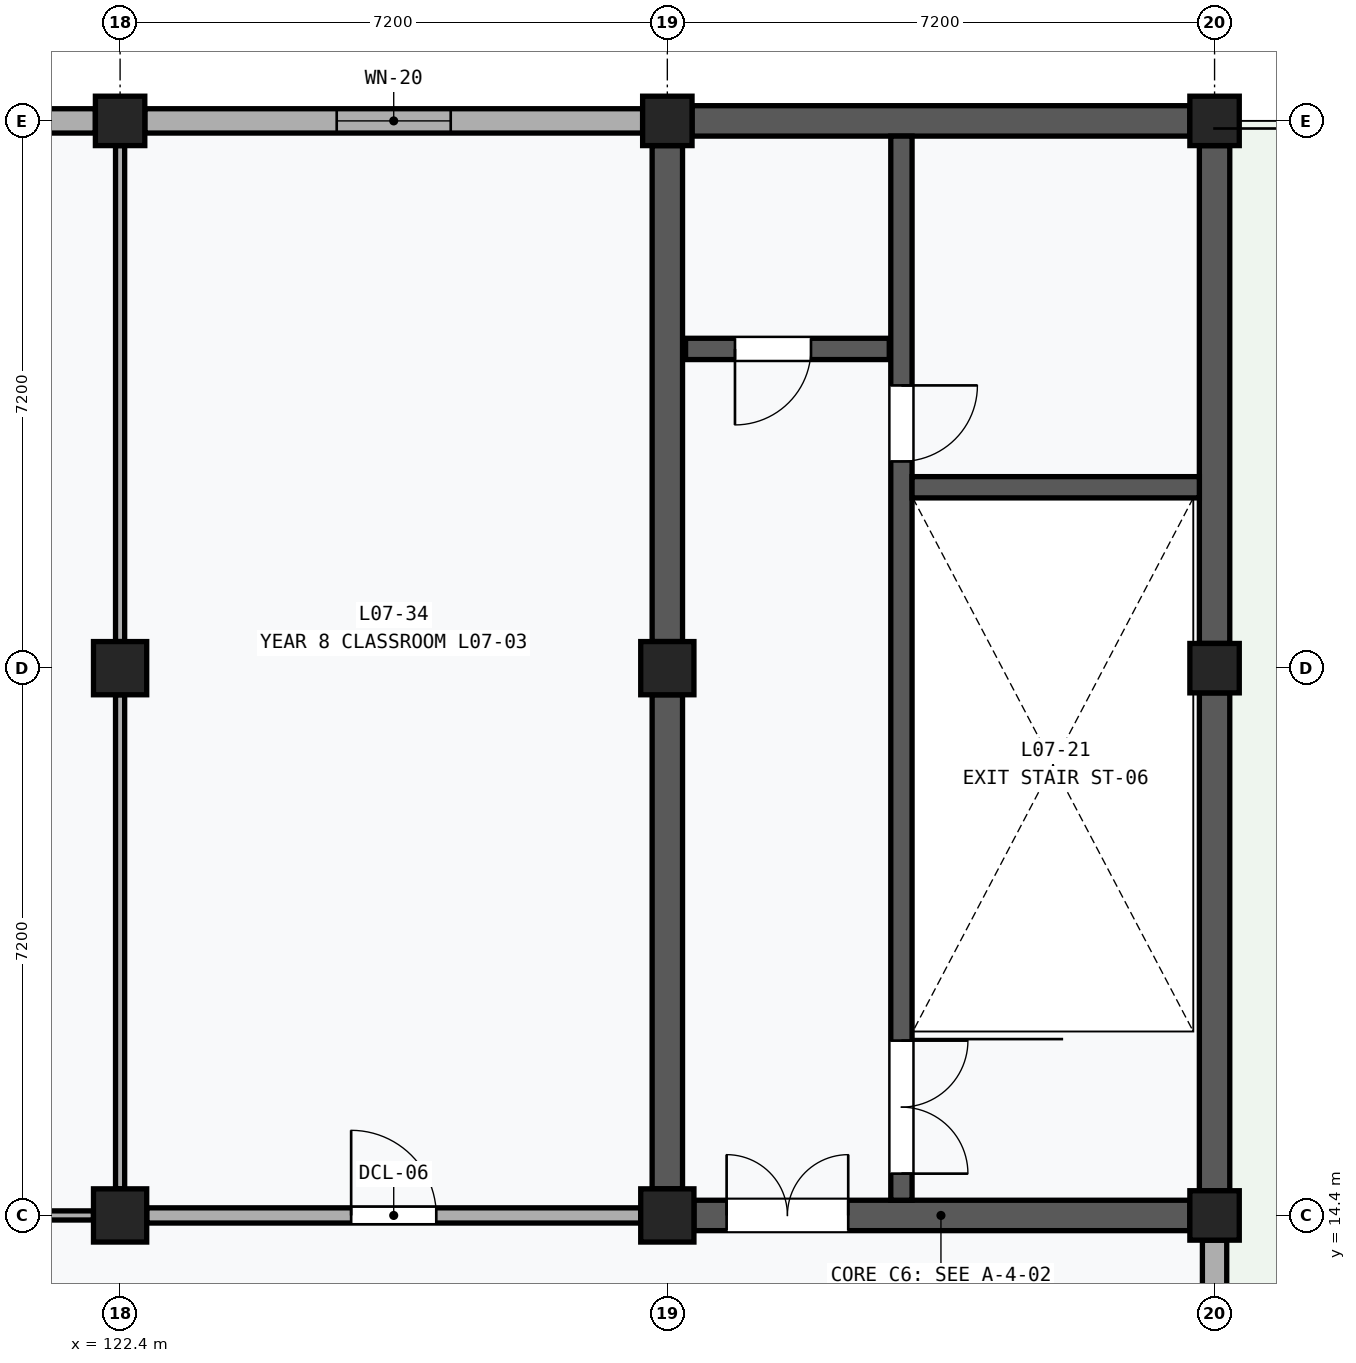
"""IFC4 building model, lengths in metres.
Left out: names, types, materials, properties, quantities, classifications, styles, units other than length and angle.
Written with IfcOpenShell. Run it as: python <this file> out.ifc"""

import sys

from ifc_helpers import new_model, si_unit, direction, frame, frame_2d, origin, origin_2d, place, context, subcontext, project, spatial, rectangle, extrude, element, fill, save


model = new_model("IFC4")
c1 = context("Model", 3, precision=1e-05, world=origin(), true_north=direction((0.0, 1.0)))
c2 = subcontext(c1, "Body", "Model", "MODEL_VIEW")
j1 = project(units=[si_unit("LENGTHUNIT", "METRE"), si_unit("PLANEANGLEUNIT", "RADIAN")], contexts=[c1])
p1 = place(None, origin())
s1 = spatial("IfcSite", under=j1, at=p1, CompositionType="ELEMENT")
p2 = place(p1, origin())
s2 = spatial("IfcBuilding", under=s1, at=p2, CompositionType="ELEMENT")
p3 = place(p2, frame((0.0, 0.0, 30.6)))
s3 = spatial("IfcBuildingStorey", under=s2, at=p3, CompositionType="ELEMENT", Elevation=30.6)
for number, where, z_axis, x_axis in (
    (1, (122.4, 14.4, 0.0), (0.0, 0.0, 1.0), (1.0, 0.0, 0.0)),
    (2, (122.4, 21.6, 0.0), (0.0, 0.0, 1.0), (1.0, 0.0, 0.0)),
):
    element("IfcColumn", number, at=place(p3, frame(where, z_axis=z_axis, x_axis=x_axis)), inside=s3, PredefinedType="COLUMN", context=c2, shape_type="SweptSolid", body=[
        extrude(rectangle(XDim=0.7, YDim=0.7, at=origin_2d()), origin(), (0.0, 0.0, 1.0), 4.2),
    ])
p4 = place(p3, frame((122.4, 28.8, 0.0), z_axis=(0.0, 0.0, 1.0), x_axis=(1.0, 0.0, 0.0)))
e3 = element("IfcColumn", 3, at=p4, inside=s3, PredefinedType="COLUMN", context=c2, shape_type="SweptSolid", body=[
    extrude(rectangle(XDim=0.65, YDim=0.65, at=origin_2d()), origin(), (0.0, 0.0, 1.0), 4.2),
])
for number, where, z_axis, x_axis in (
    (4, (129.6, 14.4, 0.0), (0.0, 0.0, 1.0), (1.0, 0.0, 0.0)),
    (5, (129.6, 21.6, 0.0), (0.0, 0.0, 1.0), (1.0, 0.0, 0.0)),
):
    element("IfcColumn", number, at=place(p3, frame(where, z_axis=z_axis, x_axis=x_axis)), inside=s3, PredefinedType="COLUMN", context=c2, shape_type="SweptSolid", body=[
        extrude(rectangle(XDim=0.7, YDim=0.7, at=origin_2d()), origin(), (0.0, 0.0, 1.0), 4.2),
    ])
for number, where, z_axis, x_axis in (
    (6, (129.6, 28.8, 0.0), (0.0, 0.0, 1.0), (1.0, 0.0, 0.0)),
    (7, (136.8, 14.4, 0.0), (0.0, 0.0, 1.0), (1.0, 0.0, 0.0)),
    (8, (136.8, 21.6, 0.0), (0.0, 0.0, 1.0), (1.0, 0.0, 0.0)),
    (9, (136.8, 28.8, 0.0), (0.0, 0.0, 1.0), (1.0, 0.0, 0.0)),
):
    element("IfcColumn", number, at=place(p3, frame(where, z_axis=z_axis, x_axis=x_axis)), inside=s3, PredefinedType="COLUMN", context=c2, shape_type="SweptSolid", body=[
        extrude(rectangle(XDim=0.65, YDim=0.65, at=origin_2d()), origin(), (0.0, 0.0, 1.0), 4.2),
    ])
p5 = place(p3, frame((115.45, 28.8, 0.0), z_axis=(0.0, 0.0, 1.0), x_axis=(1.0, 0.0, 0.0)))
e10 = element("IfcWall", 10, at=p5, inside=s3, PredefinedType="SOLIDWALL", context=c2, shape_type="SweptSolid", body=[
    extrude(rectangle(XDim=6.625, YDim=0.32, at=frame_2d((3.312, 0.0))), origin(), (0.0, 0.0, 1.0), 3.25),
])
p6 = place(p5, frame((2.062, 0.0, 1.1)))
e11 = element("IfcOpeningElement", 11, at=p6, cuts=e10, PredefinedType="OPENING", context=c2, shape_type="SweptSolid", body=[
    extrude(rectangle(XDim=2.5, YDim=1.5, at=frame_2d((1.25, 0.75))), frame((0.0, 0.172, 0.0), z_axis=(0.0, -1.0, 0.0), x_axis=(1.0, 0.0, 0.0)), (0.0, 0.0, 1.0), 0.344),
])
p7 = place(p3, frame((122.725, 28.8, 0.0), z_axis=(0.0, 0.0, 1.0), x_axis=(1.0, 0.0, 0.0)))
e12 = element("IfcWall", 12, at=p7, inside=s3, PredefinedType="SOLIDWALL", context=c2, shape_type="SweptSolid", body=[
    extrude(rectangle(XDim=6.55, YDim=0.32, at=frame_2d((3.275, 0.0))), origin(), (0.0, 0.0, 1.0), 3.25),
])
p8 = place(p7, frame((2.525, 0.0, 1.2)))
e13 = element("IfcOpeningElement", 13, at=p8, cuts=e12, PredefinedType="OPENING", context=c2, shape_type="SweptSolid", body=[
    extrude(rectangle(XDim=1.5, YDim=1.35, at=frame_2d((0.75, 0.675))), frame((0.0, 0.172, 0.0), z_axis=(0.0, -1.0, 0.0), x_axis=(1.0, 0.0, 0.0)), (0.0, 0.0, 1.0), 0.344),
])
p9 = place(p3, frame((136.8, 7.575, 0.0), z_axis=(0.0, 0.0, 1.0), x_axis=(0.0, 1.0, 0.0)))
e14 = element("IfcWall", 14, at=p9, inside=s3, PredefinedType="SOLIDWALL", context=c2, shape_type="SweptSolid", body=[
    extrude(rectangle(XDim=6.5, YDim=0.32, at=frame_2d((3.25, 0.0))), origin(), (0.0, 0.0, 1.0), 3.25),
])
p10 = place(p9, frame((2.35, 0.0, 0.0)))
e15 = element("IfcOpeningElement", 15, at=p10, cuts=e14, PredefinedType="OPENING", context=c2, shape_type="SweptSolid", body=[
    extrude(rectangle(XDim=1.8, YDim=2.2, at=frame_2d((0.9, 1.1))), frame((0.0, 0.172, 0.0), z_axis=(0.0, -1.0, 0.0), x_axis=(1.0, 0.0, 0.0)), (0.0, 0.0, 1.0), 0.344),
])
p11 = place(p3, frame((129.6, 14.75, 0.0), z_axis=(0.0, 0.0, 1.0), x_axis=(0.0, 1.0, 0.0)))
e16 = element("IfcWall", 16, at=p11, inside=s3, PredefinedType="SHEAR", context=c2, shape_type="SweptSolid", body=[
    extrude(rectangle(XDim=6.5, YDim=0.4, at=frame_2d((3.25, 0.0))), origin(), (0.0, 0.0, 1.0), 3.11),
])
p12 = place(p3, frame((129.6, 21.95, 0.0), z_axis=(0.0, 0.0, 1.0), x_axis=(0.0, 1.0, 0.0)))
e17 = element("IfcWall", 17, at=p12, inside=s3, PredefinedType="SHEAR", context=c2, shape_type="SweptSolid", body=[
    extrude(rectangle(XDim=6.525, YDim=0.4, at=frame_2d((3.263, 0.0))), origin(), (0.0, 0.0, 1.0), 3.11),
])
p13 = place(p3, frame((136.8, 14.725, 0.0), z_axis=(0.0, 0.0, 1.0), x_axis=(0.0, 1.0, 0.0)))
e18 = element("IfcWall", 18, at=p13, inside=s3, PredefinedType="SHEAR", context=c2, shape_type="SweptSolid", body=[
    extrude(rectangle(XDim=6.55, YDim=0.4, at=frame_2d((3.275, 0.0))), origin(), (0.0, 0.0, 1.0), 3.25),
])
p14 = place(p3, frame((136.8, 21.925, 0.0), z_axis=(0.0, 0.0, 1.0), x_axis=(0.0, 1.0, 0.0)))
e19 = element("IfcWall", 19, at=p14, inside=s3, PredefinedType="SHEAR", context=c2, shape_type="SweptSolid", body=[
    extrude(rectangle(XDim=6.55, YDim=0.4, at=frame_2d((3.275, 0.0))), origin(), (0.0, 0.0, 1.0), 3.25),
])
p15 = place(p3, frame((129.95, 14.4, 0.0), z_axis=(0.0, 0.0, 1.0), x_axis=(1.0, 0.0, 0.0)))
e20 = element("IfcWall", 20, at=p15, inside=s3, PredefinedType="SHEAR", context=c2, shape_type="SweptSolid", body=[
    extrude(rectangle(XDim=6.525, YDim=0.4, at=frame_2d((3.263, 0.0))), origin(), (0.0, 0.0, 1.0), 3.18),
])
p16 = place(p15, frame((0.43, 0.0, 0.0)))
e21 = element("IfcOpeningElement", 21, at=p16, cuts=e20, PredefinedType="OPENING", context=c2, shape_type="SweptSolid", body=[
    extrude(rectangle(XDim=1.6, YDim=2.2, at=frame_2d((0.8, 1.1))), frame((0.0, 0.212, 0.0), z_axis=(0.0, -1.0, 0.0), x_axis=(1.0, 0.0, 0.0)), (0.0, 0.0, 1.0), 0.424),
])
p17 = place(p3, frame((129.925, 28.8, 0.0), z_axis=(0.0, 0.0, 1.0), x_axis=(1.0, 0.0, 0.0)))
e22 = element("IfcWall", 22, at=p17, inside=s3, PredefinedType="SHEAR", context=c2, shape_type="SweptSolid", body=[
    extrude(rectangle(XDim=6.55, YDim=0.4, at=frame_2d((3.275, 0.0))), origin(), (0.0, 0.0, 1.0), 3.25),
])
p18 = place(p3, frame((132.68, 14.6, 0.0), z_axis=(0.0, 0.0, 1.0), x_axis=(0.0, 1.0, 0.0)))
e23 = element("IfcWall", 23, at=p18, inside=s3, PredefinedType="SHEAR", context=c2, shape_type="SweptSolid", body=[
    extrude(rectangle(XDim=14.0, YDim=0.28, at=frame_2d((7.0, 0.0))), origin(), (0.0, 0.0, 1.0), 3.88),
])
p19 = place(p18, frame((0.35, 0.0, 0.0)))
e24 = element("IfcOpeningElement", 24, at=p19, cuts=e23, PredefinedType="OPENING", context=c2, shape_type="SweptSolid", body=[
    extrude(rectangle(XDim=1.75, YDim=2.15, at=frame_2d((0.875, 1.075))), frame((0.0, 0.152, 0.0), z_axis=(0.0, -1.0, 0.0), x_axis=(1.0, 0.0, 0.0)), (0.0, 0.0, 1.0), 0.304),
])
p20 = place(p18, frame((9.72, 0.0, 0.0)))
e25 = element("IfcOpeningElement", 25, at=p20, cuts=e23, PredefinedType="OPENING", context=c2, shape_type="SweptSolid", body=[
    extrude(rectangle(XDim=1.0, YDim=2.15, at=frame_2d((0.5, 1.075))), frame((0.0, 0.152, 0.0), z_axis=(0.0, -1.0, 0.0), x_axis=(1.0, 0.0, 0.0)), (0.0, 0.0, 1.0), 0.304),
])
p21 = place(p3, frame((132.82, 23.98, 0.0), z_axis=(0.0, 0.0, 1.0), x_axis=(1.0, 0.0, 0.0)))
e26 = element("IfcWall", 26, at=p21, inside=s3, PredefinedType="SHEAR", context=c2, shape_type="SweptSolid", body=[
    extrude(rectangle(XDim=3.78, YDim=0.28, at=frame_2d((1.89, 0.0))), origin(), (0.0, 0.0, 1.0), 3.88),
])
p22 = place(p3, frame((129.84, 25.8, 0.0), z_axis=(0.0, 0.0, 1.0), x_axis=(1.0, 0.0, 0.0)))
e27 = element("IfcWall", 27, at=p22, inside=s3, PredefinedType="SHEAR", context=c2, shape_type="SweptSolid", body=[
    extrude(rectangle(XDim=2.68, YDim=0.28, at=frame_2d((1.34, 0.0))), origin(), (0.0, 0.0, 1.0), 3.88),
])
p23 = place(p22, frame((0.65, 0.0, 0.0)))
e28 = element("IfcOpeningElement", 28, at=p23, cuts=e27, PredefinedType="OPENING", context=c2, shape_type="SweptSolid", body=[
    extrude(rectangle(XDim=1.0, YDim=2.15, at=frame_2d((0.5, 1.075))), frame((0.0, 0.152, 0.0), z_axis=(0.0, -1.0, 0.0), x_axis=(1.0, 0.0, 0.0)), (0.0, 0.0, 1.0), 0.304),
])
p24 = place(p3, frame((115.55, 14.4, 0.0), z_axis=(0.0, 0.0, 1.0), x_axis=(1.0, 0.0, 0.0)))
e29 = element("IfcWall", 29, at=p24, inside=s3, PredefinedType="MOVABLE", context=c2, shape_type="SweptSolid", body=[
    extrude(rectangle(XDim=6.5, YDim=0.12, at=frame_2d((3.25, 0.0))), origin(), (0.0, 0.0, 1.0), 3.11),
])
p25 = place(p24, frame((2.71, 0.0, 0.0)))
e30 = element("IfcOpeningElement", 30, at=p25, cuts=e29, PredefinedType="OPENING", context=c2, shape_type="SweptSolid", body=[
    extrude(rectangle(XDim=1.08, YDim=2.18, at=frame_2d((0.54, 1.09))), frame((0.0, 0.072, 0.0), z_axis=(0.0, -1.0, 0.0), x_axis=(1.0, 0.0, 0.0)), (0.0, 0.0, 1.0), 0.144),
])
p26 = place(p3, frame((122.4, 14.75, 0.0), z_axis=(0.0, 0.0, 1.0), x_axis=(0.0, 1.0, 0.0)))
e31 = element("IfcWall", 31, at=p26, inside=s3, PredefinedType="MOVABLE", context=c2, shape_type="SweptSolid", body=[
    extrude(rectangle(XDim=6.5, YDim=0.12, at=frame_2d((3.25, 0.0))), origin(), (0.0, 0.0, 1.0), 3.11),
])
p27 = place(p3, frame((122.4, 21.95, 0.0), z_axis=(0.0, 0.0, 1.0), x_axis=(0.0, 1.0, 0.0)))
e32 = element("IfcWall", 32, at=p27, inside=s3, PredefinedType="MOVABLE", context=c2, shape_type="SweptSolid", body=[
    extrude(rectangle(XDim=6.525, YDim=0.12, at=frame_2d((3.263, 0.0))), origin(), (0.0, 0.0, 1.0), 3.11),
])
p28 = place(p3, frame((122.75, 14.4, 0.0), z_axis=(0.0, 0.0, 1.0), x_axis=(1.0, 0.0, 0.0)))
e33 = element("IfcWall", 33, at=p28, inside=s3, PredefinedType="PARTITIONING", context=c2, shape_type="SweptSolid", body=[
    extrude(rectangle(XDim=6.5, YDim=0.2, at=frame_2d((3.25, 0.0))), origin(), (0.0, 0.0, 1.0), 3.11),
])
p29 = place(p28, frame((2.69, 0.0, 0.0)))
e34 = element("IfcOpeningElement", 34, at=p29, cuts=e33, PredefinedType="OPENING", context=c2, shape_type="SweptSolid", body=[
    extrude(rectangle(XDim=1.12, YDim=2.2, at=frame_2d((0.56, 1.1))), frame((0.0, 0.112, 0.0), z_axis=(0.0, -1.0, 0.0), x_axis=(1.0, 0.0, 0.0)), (0.0, 0.0, 1.0), 0.224),
])
p30 = place(p8, origin())
e35 = element("IfcWindow", 35, at=p30, inside=s3, PartitioningType="SINGLE_PANEL", PredefinedType="WINDOW", context=c2, shape_type="SweptSolid", body=[
    extrude(rectangle(XDim=1.5, YDim=1.35, at=frame_2d((0.75, 0.675))), frame((0.0, 0.03, 0.0), z_axis=(0.0, -1.0, 0.0), x_axis=(1.0, 0.0, 0.0)), (0.0, 0.0, 1.0), 0.06),
])
fill(e13, e35)
p31 = place(p16, origin())
e36 = element("IfcDoor", 36, at=p31, inside=s3, OperationType="DOUBLE_DOOR_SINGLE_SWING", PredefinedType="DOOR", context=c2, shape_type="SweptSolid", body=[
    extrude(rectangle(XDim=1.6, YDim=2.2, at=frame_2d((0.8, 1.1))), frame((0.0, 0.025, 0.0), z_axis=(0.0, -1.0, 0.0), x_axis=(1.0, 0.0, 0.0)), (0.0, 0.0, 1.0), 0.05),
])
fill(e21, e36)
p32 = place(p19, frame((1.75, 0.0, 0.0), z_axis=(0.0, 0.0, 1.0), x_axis=(-1.0, 0.0, 0.0)))
e37 = element("IfcDoor", 37, at=p32, inside=s3, OperationType="DOUBLE_DOOR_SINGLE_SWING", PredefinedType="DOOR", context=c2, shape_type="SweptSolid", body=[
    extrude(rectangle(XDim=1.75, YDim=2.15, at=frame_2d((0.875, 1.075))), frame((0.0, 0.025, 0.0), z_axis=(0.0, -1.0, 0.0), x_axis=(1.0, 0.0, 0.0)), (0.0, 0.0, 1.0), 0.05),
])
fill(e24, e37)
p33 = place(p20, frame((1.0, 0.0, 0.0), z_axis=(0.0, 0.0, 1.0), x_axis=(-1.0, 0.0, 0.0)))
e38 = element("IfcDoor", 38, at=p33, inside=s3, OperationType="SINGLE_SWING_LEFT", PredefinedType="DOOR", context=c2, shape_type="SweptSolid", body=[
    extrude(rectangle(XDim=1.0, YDim=2.15, at=frame_2d((0.5, 1.075))), frame((0.0, 0.025, 0.0), z_axis=(0.0, -1.0, 0.0), x_axis=(1.0, 0.0, 0.0)), (0.0, 0.0, 1.0), 0.05),
])
fill(e25, e38)
p34 = place(p23, frame((1.0, 0.0, 0.0), z_axis=(0.0, 0.0, 1.0), x_axis=(-1.0, 0.0, 0.0)))
e39 = element("IfcDoor", 39, at=p34, inside=s3, OperationType="SINGLE_SWING_RIGHT", PredefinedType="DOOR", context=c2, shape_type="SweptSolid", body=[
    extrude(rectangle(XDim=1.0, YDim=2.15, at=frame_2d((0.5, 1.075))), frame((0.0, 0.025, 0.0), z_axis=(0.0, -1.0, 0.0), x_axis=(1.0, 0.0, 0.0)), (0.0, 0.0, 1.0), 0.05),
])
fill(e28, e39)
p35 = place(p29, origin())
e40 = element("IfcDoor", 40, at=p35, inside=s3, OperationType="SINGLE_SWING_LEFT", PredefinedType="DOOR", context=c2, shape_type="SweptSolid", body=[
    extrude(rectangle(XDim=1.12, YDim=2.2, at=frame_2d((0.56, 1.1))), frame((0.0, 0.025, 0.0), z_axis=(0.0, -1.0, 0.0), x_axis=(1.0, 0.0, 0.0)), (0.0, 0.0, 1.0), 0.05),
])
fill(e34, e40)
save(model, sys.argv[1])
